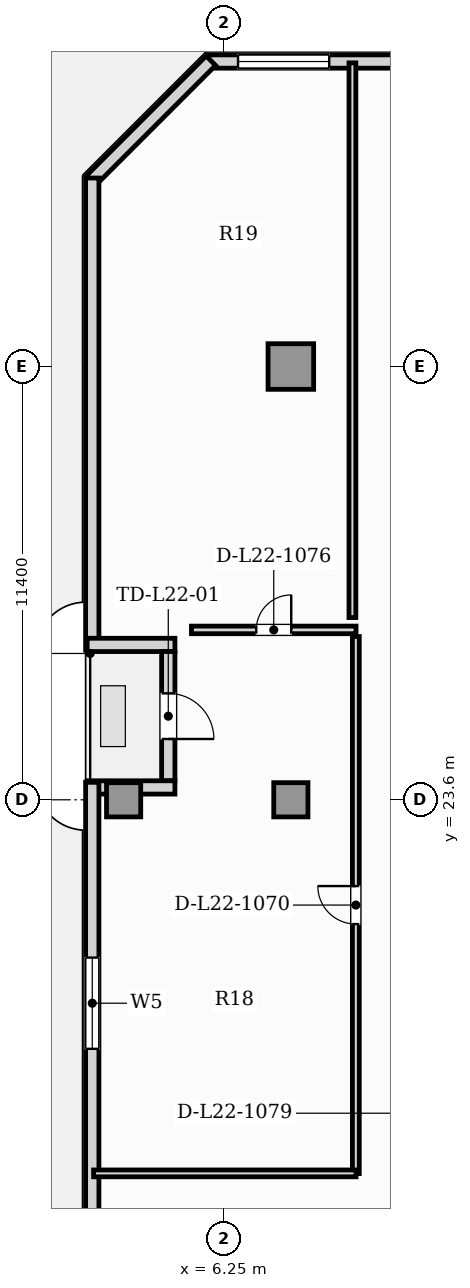
"""IFC4 building model, lengths in metres.
Left out: names, types, materials, properties, quantities, classifications, styles, units other than length and angle.
Written with IfcOpenShell. Run it as: python <this file> out.ifc"""

import sys

from ifc_helpers import new_model, si_unit, direction, frame, frame_2d, origin, origin_2d, place, context, subcontext, project, spatial, rectangle, hollow_rectangle, extrude, element, fill, save


model = new_model("IFC4")
c1 = context("Model", 3, precision=1e-05, world=origin(), true_north=direction((0.0, 1.0)))
c2 = subcontext(c1, "Body", "Model", "MODEL_VIEW")
j1 = project(units=[si_unit("LENGTHUNIT", "METRE"), si_unit("PLANEANGLEUNIT", "RADIAN")], contexts=[c1])
p1 = place(None, origin())
s1 = spatial("IfcSite", under=j1, at=p1, CompositionType="ELEMENT")
p2 = place(p1, origin())
s2 = spatial("IfcBuilding", under=s1, at=p2, CompositionType="ELEMENT")
p3 = place(p2, frame((0.0, 0.0, 92.6)))
s3 = spatial("IfcBuildingStorey", under=s2, at=p3, CompositionType="ELEMENT", Elevation=92.6)
p4 = place(p3, frame((8.0, 35.0, 0.0), z_axis=(0.0, 0.0, 1.0), x_axis=(1.0, 0.0, 0.0)))
e1 = element("IfcColumn", 1, at=p4, inside=s3, PredefinedType="USERDEFINED", context=c2, shape_type="SweptSolid", body=[
    extrude(hollow_rectangle(XDim=1.2, YDim=1.2, WallThickness=0.07, at=origin_2d()), origin(), (0.0, 0.0, 1.0), 3.85),
])
for number, where, z_axis, x_axis in (
    (2, (3.6, 23.6, 0.0), (0.0, 0.0, 1.0), (1.0, 0.0, 0.0)),
    (3, (8.0, 23.6, 0.0), (0.0, 0.0, 1.0), (1.0, 0.0, 0.0)),
):
    element("IfcColumn", number, at=place(p3, frame(where, z_axis=z_axis, x_axis=x_axis)), inside=s3, PredefinedType="COLUMN", context=c2, shape_type="SweptSolid", body=[
        extrude(rectangle(XDim=0.9, YDim=0.9, at=origin_2d()), origin(), (0.0, 0.0, 1.0), 3.85),
    ])
p5 = place(p3, frame((51.66, 43.025, 0.0), z_axis=(0.0, 0.0, 1.0), x_axis=(-1.0, 0.0, 0.0)))
e4 = element("IfcWall", 4, at=p5, inside=s3, PredefinedType="SOLIDWALL", context=c2, shape_type="SweptSolid", body=[
    extrude(rectangle(XDim=45.82, YDim=0.35, at=frame_2d((22.91, 0.0))), origin(), (0.0, 0.0, 1.0), 3.6),
])
p6 = place(p5, frame((42.65, 0.0, 0.85)))
e5 = element("IfcOpeningElement", 5, at=p6, cuts=e4, PredefinedType="OPENING", context=c2, shape_type="SweptSolid", body=[
    extrude(rectangle(XDim=2.4, YDim=2.0, at=frame_2d((1.2, 1.0))), frame((0.0, 0.185, 0.0), z_axis=(0.0, -1.0, 0.0), x_axis=(1.0, 0.0, 0.0)), (0.0, 0.0, 1.0), 0.37),
])
p7 = place(p5, frame((37.984, 0.0, 0.9)))
e6 = element("IfcOpeningElement", 6, at=p7, cuts=e4, PredefinedType="OPENING", context=c2, shape_type="SweptSolid", body=[
    extrude(rectangle(XDim=0.9, YDim=1.4, at=frame_2d((0.45, 0.7))), frame((0.0, 0.185, 0.0), z_axis=(0.0, -1.0, 0.0), x_axis=(1.0, 0.0, 0.0)), (0.0, 0.0, 1.0), 0.37),
])
p8 = place(p5, frame((32.46, 0.0, 0.9)))
e7 = element("IfcOpeningElement", 7, at=p8, cuts=e4, PredefinedType="OPENING", context=c2, shape_type="SweptSolid", body=[
    extrude(rectangle(XDim=1.5, YDim=1.95, at=frame_2d((0.75, 0.975))), frame((0.0, 0.185, 0.0), z_axis=(0.0, -1.0, 0.0), x_axis=(1.0, 0.0, 0.0)), (0.0, 0.0, 1.0), 0.37),
])
p9 = place(p5, frame((28.245, 0.0, 0.9)))
e8 = element("IfcOpeningElement", 8, at=p9, cuts=e4, PredefinedType="OPENING", context=c2, shape_type="SweptSolid", body=[
    extrude(rectangle(XDim=1.5, YDim=1.95, at=frame_2d((0.75, 0.975))), frame((0.0, 0.185, 0.0), z_axis=(0.0, -1.0, 0.0), x_axis=(1.0, 0.0, 0.0)), (0.0, 0.0, 1.0), 0.37),
])
p10 = place(p5, frame((24.03, 0.0, 0.9)))
e9 = element("IfcOpeningElement", 9, at=p10, cuts=e4, PredefinedType="OPENING", context=c2, shape_type="SweptSolid", body=[
    extrude(rectangle(XDim=1.5, YDim=1.95, at=frame_2d((0.75, 0.975))), frame((0.0, 0.185, 0.0), z_axis=(0.0, -1.0, 0.0), x_axis=(1.0, 0.0, 0.0)), (0.0, 0.0, 1.0), 0.37),
])
p11 = place(p5, frame((19.815, 0.0, 0.9)))
e10 = element("IfcOpeningElement", 10, at=p11, cuts=e4, PredefinedType="OPENING", context=c2, shape_type="SweptSolid", body=[
    extrude(rectangle(XDim=1.5, YDim=1.95, at=frame_2d((0.75, 0.975))), frame((0.0, 0.185, 0.0), z_axis=(0.0, -1.0, 0.0), x_axis=(1.0, 0.0, 0.0)), (0.0, 0.0, 1.0), 0.37),
])
p12 = place(p5, frame((15.6, 0.0, 0.9)))
e11 = element("IfcOpeningElement", 11, at=p12, cuts=e4, PredefinedType="OPENING", context=c2, shape_type="SweptSolid", body=[
    extrude(rectangle(XDim=1.5, YDim=1.95, at=frame_2d((0.75, 0.975))), frame((0.0, 0.185, 0.0), z_axis=(0.0, -1.0, 0.0), x_axis=(1.0, 0.0, 0.0)), (0.0, 0.0, 1.0), 0.37),
])
p13 = place(p5, frame((11.385, 0.0, 0.9)))
e12 = element("IfcOpeningElement", 12, at=p13, cuts=e4, PredefinedType="OPENING", context=c2, shape_type="SweptSolid", body=[
    extrude(rectangle(XDim=1.5, YDim=1.95, at=frame_2d((0.75, 0.975))), frame((0.0, 0.185, 0.0), z_axis=(0.0, -1.0, 0.0), x_axis=(1.0, 0.0, 0.0)), (0.0, 0.0, 1.0), 0.37),
])
p14 = place(p5, frame((7.17, 0.0, 0.9)))
e13 = element("IfcOpeningElement", 13, at=p14, cuts=e4, PredefinedType="OPENING", context=c2, shape_type="SweptSolid", body=[
    extrude(rectangle(XDim=1.5, YDim=1.95, at=frame_2d((0.75, 0.975))), frame((0.0, 0.185, 0.0), z_axis=(0.0, -1.0, 0.0), x_axis=(1.0, 0.0, 0.0)), (0.0, 0.0, 1.0), 0.37),
])
p15 = place(p3, frame((5.896, 43.048, 0.0), z_axis=(0.0, 0.0, 1.0), x_axis=(-0.707106781187, -0.707106781187, 0.0)))
e14 = element("IfcWall", 14, at=p15, inside=s3, PredefinedType="SOLIDWALL", context=c2, shape_type="SweptSolid", body=[
    extrude(rectangle(XDim=4.446, YDim=0.35, at=frame_2d((2.223, 0.0))), origin(), (0.0, 0.0, 1.0), 3.6),
])
p16 = place(p3, frame((2.775, 39.96, 0.0), z_axis=(0.0, 0.0, 1.0), x_axis=(0.0, -1.0, 0.0)))
e15 = element("IfcWall", 15, at=p16, inside=s3, PredefinedType="SOLIDWALL", context=c2, shape_type="SweptSolid", body=[
    extrude(rectangle(XDim=12.42, YDim=0.35, at=frame_2d((6.21, 0.0))), origin(), (0.0, 0.0, 1.0), 3.6),
])
p17 = place(p3, frame((2.64, 27.675, 0.0), z_axis=(0.0, 0.0, 1.0), x_axis=(1.0, 0.0, 0.0)))
e16 = element("IfcWall", 16, at=p17, inside=s3, PredefinedType="SOLIDWALL", context=c2, shape_type="SweptSolid", body=[
    extrude(rectangle(XDim=2.31, YDim=0.35, at=frame_2d((1.155, 0.0))), origin(), (0.0, 0.0, 1.0), 3.6),
])
p18 = place(p3, frame((4.775, 27.5, 0.0), z_axis=(0.0, 0.0, 1.0), x_axis=(0.0, -1.0, 0.0)))
e17 = element("IfcWall", 17, at=p18, inside=s3, PredefinedType="SOLIDWALL", context=c2, shape_type="SweptSolid", body=[
    extrude(rectangle(XDim=3.4, YDim=0.35, at=frame_2d((1.7, 0.0))), origin(), (0.0, 0.0, 1.0), 3.6),
])
p19 = place(p18, frame((1.1, 0.0, 0.0)))
e18 = element("IfcOpeningElement", 18, at=p19, cuts=e17, PredefinedType="OPENING", context=c2, shape_type="SweptSolid", body=[
    extrude(rectangle(XDim=1.2, YDim=2.2, at=frame_2d((0.6, 1.1))), frame((0.0, 0.185, 0.0), z_axis=(0.0, -1.0, 0.0), x_axis=(1.0, 0.0, 0.0)), (0.0, 0.0, 1.0), 0.37),
])
p20 = place(p3, frame((4.95, 23.925, 0.0), z_axis=(0.0, 0.0, 1.0), x_axis=(-1.0, 0.0, 0.0)))
e19 = element("IfcWall", 19, at=p20, inside=s3, PredefinedType="SOLIDWALL", context=c2, shape_type="SweptSolid", body=[
    extrude(rectangle(XDim=2.31, YDim=0.35, at=frame_2d((1.155, 0.0))), origin(), (0.0, 0.0, 1.0), 3.055),
])
p21 = place(p3, frame((2.775, 24.06, 0.0), z_axis=(0.0, 0.0, 1.0), x_axis=(0.0, -1.0, 0.0)))
e20 = element("IfcWall", 20, at=p21, inside=s3, PredefinedType="SOLIDWALL", context=c2, shape_type="SweptSolid", body=[
    extrude(rectangle(XDim=20.82, YDim=0.35, at=frame_2d((10.41, 0.0))), origin(), (0.0, 0.0, 1.0), 3.6),
])
p22 = place(p21, frame((4.613, 0.0, 0.85)))
e21 = element("IfcOpeningElement", 21, at=p22, cuts=e20, PredefinedType="OPENING", context=c2, shape_type="SweptSolid", body=[
    extrude(rectangle(XDim=2.4, YDim=2.0, at=frame_2d((1.2, 1.0))), frame((0.0, 0.185, 0.0), z_axis=(0.0, -1.0, 0.0), x_axis=(1.0, 0.0, 0.0)), (0.0, 0.0, 1.0), 0.37),
])
p23 = place(p3, frame((9.71, 13.765, 0.0), z_axis=(0.0, 0.0, 1.0), x_axis=(0.0, 1.0, 0.0)))
e22 = element("IfcWall", 22, at=p23, inside=s3, PredefinedType="PARTITIONING", context=c2, shape_type="SweptSolid", body=[
    extrude(rectangle(XDim=14.13, YDim=0.18, at=frame_2d((7.065, 0.0))), origin(), (0.0, 0.0, 1.0), 3.6),
])
p24 = place(p23, frame((6.565, 0.0, 0.0)))
e23 = element("IfcOpeningElement", 23, at=p24, cuts=e22, PredefinedType="OPENING", context=c2, shape_type="SweptSolid", body=[
    extrude(rectangle(XDim=1.0, YDim=2.15, at=frame_2d((0.5, 1.075))), frame((0.0, 0.1, 0.0), z_axis=(0.0, -1.0, 0.0), x_axis=(1.0, 0.0, 0.0)), (0.0, 0.0, 1.0), 0.2),
])
p25 = place(p3, frame((2.81, 13.77, 0.0), z_axis=(0.0, 0.0, 1.0), x_axis=(1.0, 0.0, 0.0)))
e24 = element("IfcWall", 24, at=p25, inside=s3, PredefinedType="PARTITIONING", context=c2, shape_type="SweptSolid", body=[
    extrude(rectangle(XDim=6.905, YDim=0.18, at=frame_2d((3.453, 0.0))), origin(), (0.0, 0.0, 1.0), 3.6),
])
p26 = place(p3, frame((5.385, 28.07, 0.0), z_axis=(0.0, 0.0, 1.0), x_axis=(1.0, 0.0, 0.0)))
e25 = element("IfcWall", 25, at=p26, inside=s3, PredefinedType="PARTITIONING", context=c2, shape_type="SweptSolid", body=[
    extrude(rectangle(XDim=4.33, YDim=0.2, at=frame_2d((2.165, 0.0))), origin(), (0.0, 0.0, 1.0), 3.6),
])
p27 = place(p26, frame((1.705, 0.0, 0.0)))
e26 = element("IfcOpeningElement", 26, at=p27, cuts=e25, PredefinedType="OPENING", context=c2, shape_type="SweptSolid", body=[
    extrude(rectangle(XDim=0.92, YDim=2.1, at=frame_2d((0.46, 1.05))), frame((0.0, 0.11, 0.0), z_axis=(0.0, -1.0, 0.0), x_axis=(1.0, 0.0, 0.0)), (0.0, 0.0, 1.0), 0.22),
])
p28 = place(p3, frame((9.62, 42.99, 0.0), z_axis=(0.0, 0.0, 1.0), x_axis=(0.0, -1.0, 0.0)))
e27 = element("IfcWall", 27, at=p28, inside=s3, PredefinedType="PARTITIONING", context=c2, shape_type="SweptSolid", body=[
    extrude(rectangle(XDim=14.595, YDim=0.18, at=frame_2d((7.297, 0.0))), origin(), (0.0, 0.0, 1.0), 3.6),
])
p29 = place(p19, frame((1.2, 0.0, 0.0), z_axis=(0.0, 0.0, 1.0), x_axis=(-1.0, 0.0, 0.0)))
e28 = element("IfcDoor", 28, at=p29, inside=s3, OperationType="SINGLE_SWING_LEFT", PredefinedType="DOOR", context=c2, shape_type="SweptSolid", body=[
    extrude(rectangle(XDim=1.2, YDim=2.2, at=frame_2d((0.6, 1.1))), frame((0.0, 0.025, 0.0), z_axis=(0.0, -1.0, 0.0), x_axis=(1.0, 0.0, 0.0)), (0.0, 0.0, 1.0), 0.05),
])
fill(e18, e28)
p30 = place(p22, origin())
e29 = element("IfcWindow", 29, at=p30, inside=s3, PartitioningType="SINGLE_PANEL", PredefinedType="WINDOW", context=c2, shape_type="SweptSolid", body=[
    extrude(rectangle(XDim=2.4, YDim=2.0, at=frame_2d((1.2, 1.0))), frame((0.0, 0.03, 0.0), z_axis=(0.0, -1.0, 0.0), x_axis=(1.0, 0.0, 0.0)), (0.0, 0.0, 1.0), 0.06),
])
fill(e21, e29)
p31 = place(p6, origin())
e30 = element("IfcWindow", 30, at=p31, inside=s3, PartitioningType="SINGLE_PANEL", PredefinedType="WINDOW", context=c2, shape_type="SweptSolid", body=[
    extrude(rectangle(XDim=2.4, YDim=2.0, at=frame_2d((1.2, 1.0))), frame((0.0, 0.03, 0.0), z_axis=(0.0, -1.0, 0.0), x_axis=(1.0, 0.0, 0.0)), (0.0, 0.0, 1.0), 0.06),
])
fill(e5, e30)
p32 = place(p24, origin())
e31 = element("IfcDoor", 31, at=p32, inside=s3, OperationType="SINGLE_SWING_RIGHT", PredefinedType="DOOR", context=c2, shape_type="SweptSolid", body=[
    extrude(rectangle(XDim=1.0, YDim=2.15, at=frame_2d((0.5, 1.075))), frame((0.0, 0.025, 0.0), z_axis=(0.0, -1.0, 0.0), x_axis=(1.0, 0.0, 0.0)), (0.0, 0.0, 1.0), 0.05),
])
fill(e23, e31)
p33 = place(p27, origin())
e32 = element("IfcDoor", 32, at=p33, inside=s3, OperationType="SINGLE_SWING_RIGHT", PredefinedType="DOOR", context=c2, shape_type="SweptSolid", body=[
    extrude(rectangle(XDim=0.92, YDim=2.1, at=frame_2d((0.46, 1.05))), frame((0.0, 0.025, 0.0), z_axis=(0.0, -1.0, 0.0), x_axis=(1.0, 0.0, 0.0)), (0.0, 0.0, 1.0), 0.05),
])
fill(e26, e32)
save(model, sys.argv[1])
